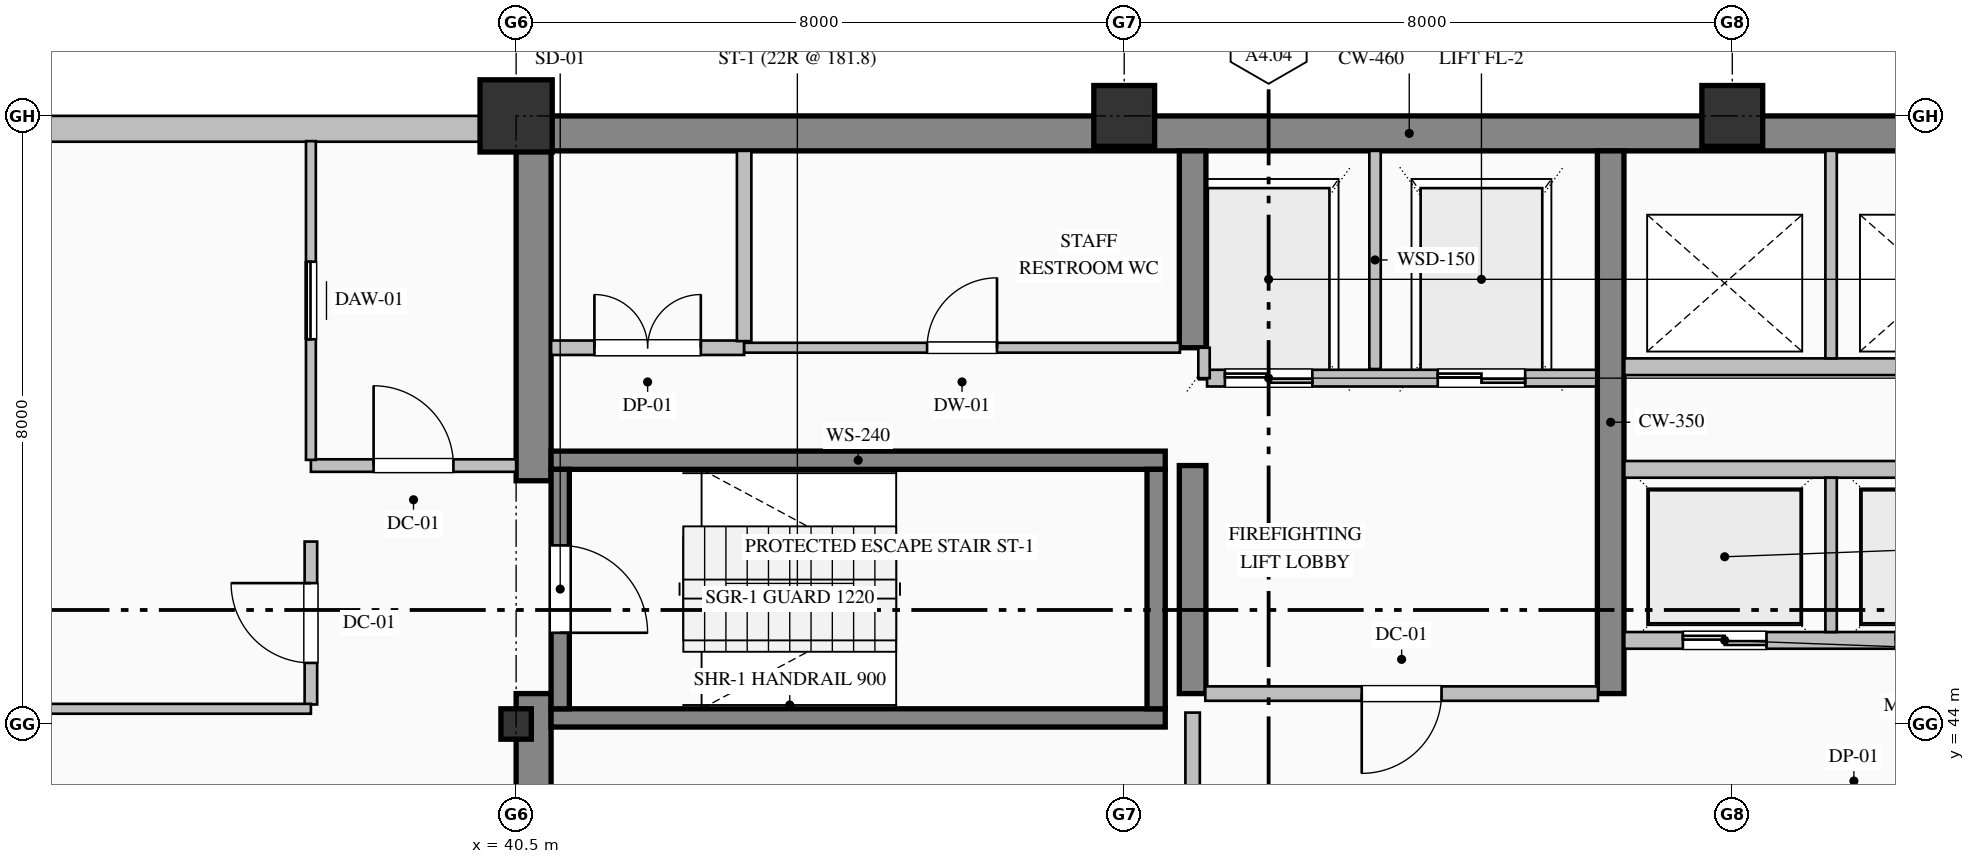
"""IFC4 building model, lengths in metres.
Left out: names, types, materials, properties, quantities, classifications, styles, units other than length and angle.
Written with IfcOpenShell. Run it as: python <this file> out.ifc"""

import sys

from ifc_helpers import new_model, si_unit, direction, frame, frame_2d, origin, origin_2d, place, context, subcontext, project, spatial, rectangle, hollow_rectangle, i_section, extrude, element, fill, save


model = new_model("IFC4")
c1 = context("Model", 3, precision=1e-05, world=origin(), true_north=direction((0.0, 1.0)))
c2 = subcontext(c1, "Body", "Model", "MODEL_VIEW")
j1 = project(units=[si_unit("LENGTHUNIT", "METRE"), si_unit("PLANEANGLEUNIT", "RADIAN")], contexts=[c1])
p1 = place(None, origin())
s1 = spatial("IfcSite", under=j1, at=p1, CompositionType="ELEMENT")
p2 = place(p1, origin())
s2 = spatial("IfcBuilding", under=s1, at=p2, CompositionType="ELEMENT")
p3 = place(p2, frame((0.0, 0.0, 261.8)))
s3 = spatial("IfcBuildingStorey", under=s2, at=p3, CompositionType="ELEMENT", Elevation=261.8)
p4 = place(p3, frame((40.5, 51.77, 0.0), z_axis=(0.0, 0.0, 1.0), x_axis=(1.0, 0.0, 0.0)))
e1 = element("IfcWall", 1, at=p4, inside=s3, PredefinedType="SHEAR", context=c2, shape_type="SweptSolid", body=[
    extrude(rectangle(XDim=23.5, YDim=0.46, at=frame_2d((11.75, 0.0))), origin(), (0.0, 0.0, 1.0), 3.775),
])
p5 = place(p3, frame((40.73, 36.46, 0.0), z_axis=(0.0, 0.0, 1.0), x_axis=(0.0, 1.0, 0.0)))
e2 = element("IfcWall", 2, at=p5, inside=s3, PredefinedType="SHEAR", context=c2, shape_type="SweptSolid", body=[
    extrude(rectangle(XDim=7.94, YDim=0.46, at=frame_2d((3.97, 0.0))), origin(), (0.0, 0.0, 1.0), 3.775),
])
p6 = place(p3, frame((40.73, 47.2, 0.0), z_axis=(0.0, 0.0, 1.0), x_axis=(0.0, 1.0, 0.0)))
e3 = element("IfcWall", 3, at=p6, inside=s3, PredefinedType="SHEAR", context=c2, shape_type="SweptSolid", body=[
    extrude(rectangle(XDim=4.34, YDim=0.46, at=frame_2d((2.17, 0.0))), origin(), (0.0, 0.0, 1.0), 3.775),
])
p7 = place(p3, frame((49.4, 44.4, 0.0), z_axis=(0.0, 0.0, 1.0), x_axis=(0.0, 1.0, 0.0)))
e4 = element("IfcWall", 4, at=p7, inside=s3, PredefinedType="SHEAR", context=c2, shape_type="SweptSolid", body=[
    extrude(rectangle(XDim=3.0, YDim=0.35, at=frame_2d((1.5, 0.0))), origin(), (0.0, 0.0, 1.0), 3.775),
])
p8 = place(p3, frame((49.4, 48.95, 0.0), z_axis=(0.0, 0.0, 1.0), x_axis=(0.0, 1.0, 0.0)))
e5 = element("IfcWall", 5, at=p8, inside=s3, PredefinedType="SHEAR", context=c2, shape_type="SweptSolid", body=[
    extrude(rectangle(XDim=2.59, YDim=0.35, at=frame_2d((1.295, 0.0))), origin(), (0.0, 0.0, 1.0), 3.775),
])
p9 = place(p3, frame((54.9, 44.4, 0.0), z_axis=(0.0, 0.0, 1.0), x_axis=(0.0, 1.0, 0.0)))
e6 = element("IfcWall", 6, at=p9, inside=s3, PredefinedType="SHEAR", context=c2, shape_type="SweptSolid", body=[
    extrude(rectangle(XDim=7.14, YDim=0.35, at=frame_2d((3.57, 0.0))), origin(), (0.0, 0.0, 1.0), 3.775),
])
p10 = place(p3, frame((40.5, 44.0, 0.0), z_axis=(0.0, 0.0, 1.0), x_axis=(1.0, 0.0, 0.0)))
e7 = element("IfcColumn", 7, at=p10, inside=s3, PredefinedType="COLUMN", context=c2, shape_type="SweptSolid", body=[
    extrude(i_section(OverallWidth=0.4, OverallDepth=0.4, WebThickness=0.013, FlangeThickness=0.021, FilletRadius=0.022, at=origin_2d()), origin(), (0.0, 0.0, 1.0), 4.0),
])
p11 = place(p3, frame((40.5, 52.0, 0.0), z_axis=(0.0, 0.0, 1.0), x_axis=(1.0, 0.0, 0.0)))
e8 = element("IfcColumn", 8, at=p11, inside=s3, PredefinedType="COLUMN", context=c2, shape_type="SweptSolid", body=[
    extrude(hollow_rectangle(XDim=0.95, YDim=0.95, WallThickness=0.036, at=origin_2d()), origin(), (0.0, 0.0, 1.0), 4.0),
])
for number, where, z_axis, x_axis in (
    (9, (48.5, 52.0, 0.0), (0.0, 0.0, 1.0), (1.0, 0.0, 0.0)),
    (10, (56.5, 52.0, 0.0), (0.0, 0.0, 1.0), (1.0, 0.0, 0.0)),
):
    element("IfcColumn", number, at=place(p3, frame(where, z_axis=z_axis, x_axis=x_axis)), inside=s3, PredefinedType="COLUMN", context=c2, shape_type="SweptSolid", body=[
        extrude(hollow_rectangle(XDim=0.8, YDim=0.8, WallThickness=0.032, at=origin_2d()), origin(), (0.0, 0.0, 1.0), 4.0),
    ])
p12 = place(p3, frame((13.0, 51.83, 0.0), z_axis=(0.0, 0.0, 1.0), x_axis=(1.0, 0.0, 0.0)))
e11 = element("IfcWall", 11, at=p12, inside=s3, PredefinedType="SOLIDWALL", context=c2, shape_type="SweptSolid", body=[
    extrude(rectangle(XDim=27.52, YDim=0.34, at=frame_2d((13.76, 0.0))), origin(), (0.0, 0.0, 1.0), 3.325),
])
p13 = place(p12, frame((6.6, 0.0, 0.9)))
e12 = element("IfcOpeningElement", 12, at=p13, cuts=e11, PredefinedType="OPENING", context=c2, shape_type="SweptSolid", body=[
    extrude(rectangle(XDim=1.2, YDim=1.85, at=frame_2d((0.6, 0.925))), frame((0.0, 0.18, 0.0), z_axis=(0.0, -1.0, 0.0), x_axis=(1.0, 0.0, 0.0)), (0.0, 0.0, 1.0), 0.36),
])
p14 = place(p12, frame((17.4, 0.0, 0.9)))
e13 = element("IfcOpeningElement", 13, at=p14, cuts=e11, PredefinedType="OPENING", context=c2, shape_type="SweptSolid", body=[
    extrude(rectangle(XDim=1.2, YDim=1.85, at=frame_2d((0.6, 0.925))), frame((0.0, 0.18, 0.0), z_axis=(0.0, -1.0, 0.0), x_axis=(1.0, 0.0, 0.0)), (0.0, 0.0, 1.0), 0.36),
])
for number, where, z_axis, x_axis in (
    (14, (40.96, 47.47, 0.0), (0.0, 0.0, 1.0), (1.0, 0.0, 0.0)),
    (15, (49.04, 44.08, 0.0), (0.0, 0.0, 1.0), (-1.0, 0.0, 0.0)),
):
    element("IfcWall", number, at=place(p3, frame(where, z_axis=z_axis, x_axis=x_axis)), inside=s3, PredefinedType="SOLIDWALL", context=c2, shape_type="SweptSolid", body=[
        extrude(rectangle(XDim=8.08, YDim=0.24, at=frame_2d((4.04, 0.0))), origin(), (0.0, 0.0, 1.0), 4.0),
    ])
p15 = place(p3, frame((41.08, 47.35, 0.0), z_axis=(0.0, 0.0, 1.0), x_axis=(0.0, -1.0, 0.0)))
e16 = element("IfcWall", 16, at=p15, inside=s3, PredefinedType="SOLIDWALL", context=c2, shape_type="SweptSolid", body=[
    extrude(rectangle(XDim=3.15, YDim=0.24, at=frame_2d((1.575, 0.0))), origin(), (0.0, 0.0, 1.0), 4.0),
])
p16 = place(p15, frame((1.0, 0.0, 0.0)))
e17 = element("IfcOpeningElement", 17, at=p16, cuts=e16, PredefinedType="OPENING", context=c2, shape_type="SweptSolid", body=[
    extrude(rectangle(XDim=1.15, YDim=2.2, at=frame_2d((0.575, 1.1))), frame((0.0, 0.13, 0.0), z_axis=(0.0, -1.0, 0.0), x_axis=(1.0, 0.0, 0.0)), (0.0, 0.0, 1.0), 0.26),
])
p17 = place(p3, frame((48.92, 44.2, 0.0), z_axis=(0.0, 0.0, 1.0), x_axis=(0.0, 1.0, 0.0)))
e18 = element("IfcWall", 18, at=p17, inside=s3, PredefinedType="SOLIDWALL", context=c2, shape_type="SweptSolid", body=[
    extrude(rectangle(XDim=3.15, YDim=0.24, at=frame_2d((1.575, 0.0))), origin(), (0.0, 0.0, 1.0), 4.0),
])
p18 = place(p3, frame((54.71, 48.55, 0.0), z_axis=(0.0, 0.0, 1.0), x_axis=(-1.0, 0.0, 0.0)))
e19 = element("IfcWall", 19, at=p18, inside=s3, PredefinedType="PARTITIONING", context=c2, shape_type="SweptSolid", body=[
    extrude(rectangle(XDim=5.12, YDim=0.22, at=frame_2d((2.56, 0.0))), origin(), (0.0, 0.0, 1.0), 3.775),
])
p19 = place(p18, frame((3.735, 0.0, 0.0)))
e20 = element("IfcOpeningElement", 20, at=p19, cuts=e19, PredefinedType="OPENING", context=c2, shape_type="SweptSolid", body=[
    extrude(rectangle(XDim=1.15, YDim=2.2, at=frame_2d((0.575, 1.1))), frame((0.0, 0.12, 0.0), z_axis=(0.0, -1.0, 0.0), x_axis=(1.0, 0.0, 0.0)), (0.0, 0.0, 1.0), 0.24),
])
p20 = place(p18, frame((0.935, 0.0, 0.0)))
e21 = element("IfcOpeningElement", 21, at=p20, cuts=e19, PredefinedType="OPENING", context=c2, shape_type="SweptSolid", body=[
    extrude(rectangle(XDim=1.15, YDim=2.2, at=frame_2d((0.575, 1.1))), frame((0.0, 0.12, 0.0), z_axis=(0.0, -1.0, 0.0), x_axis=(1.0, 0.0, 0.0)), (0.0, 0.0, 1.0), 0.24),
])
p21 = place(p3, frame((51.8, 48.67, 0.0), z_axis=(0.0, 0.0, 1.0), x_axis=(0.0, 1.0, 0.0)))
e22 = element("IfcWall", 22, at=p21, inside=s3, PredefinedType="PARTITIONING", context=c2, shape_type="SweptSolid", body=[
    extrude(rectangle(XDim=2.87, YDim=0.15, at=frame_2d((1.435, 0.0))), origin(), (0.0, 0.0, 1.0), 3.775),
])
p22 = place(p3, frame((49.55, 48.55, 0.0), z_axis=(0.0, 0.0, 1.0), x_axis=(0.0, 1.0, 0.0)))
e23 = element("IfcWall", 23, at=p22, inside=s3, PredefinedType="PARTITIONING", context=c2, shape_type="SweptSolid", body=[
    extrude(rectangle(XDim=0.4, YDim=0.15, at=frame_2d((0.2, 0.0))), origin(), (0.0, 0.0, 1.0), 3.775),
])
p23 = place(p3, frame((63.32, 45.1, 0.0), z_axis=(0.0, 0.0, 1.0), x_axis=(-1.0, 0.0, 0.0)))
e24 = element("IfcWall", 24, at=p23, inside=s3, PredefinedType="PARTITIONING", context=c2, shape_type="SweptSolid", body=[
    extrude(rectangle(XDim=8.24, YDim=0.22, at=frame_2d((4.12, 0.0))), origin(), (0.0, 0.0, 1.0), 3.775),
])
p24 = place(p23, frame((6.37, 0.0, 0.0)))
e25 = element("IfcOpeningElement", 25, at=p24, cuts=e24, PredefinedType="OPENING", context=c2, shape_type="SweptSolid", body=[
    extrude(rectangle(XDim=1.1, YDim=2.2, at=frame_2d((0.55, 1.1))), frame((0.0, 0.12, 0.0), z_axis=(0.0, -1.0, 0.0), x_axis=(1.0, 0.0, 0.0)), (0.0, 0.0, 1.0), 0.24),
])
p25 = place(p23, frame((3.57, 0.0, 0.0)))
e26 = element("IfcOpeningElement", 26, at=p25, cuts=e24, PredefinedType="OPENING", context=c2, shape_type="SweptSolid", body=[
    extrude(rectangle(XDim=1.1, YDim=2.2, at=frame_2d((0.55, 1.1))), frame((0.0, 0.12, 0.0), z_axis=(0.0, -1.0, 0.0), x_axis=(1.0, 0.0, 0.0)), (0.0, 0.0, 1.0), 0.24),
])
p26 = place(p23, frame((0.77, 0.0, 0.0)))
e27 = element("IfcOpeningElement", 27, at=p26, cuts=e24, PredefinedType="OPENING", context=c2, shape_type="SweptSolid", body=[
    extrude(rectangle(XDim=1.1, YDim=2.2, at=frame_2d((0.55, 1.1))), frame((0.0, 0.12, 0.0), z_axis=(0.0, -1.0, 0.0), x_axis=(1.0, 0.0, 0.0)), (0.0, 0.0, 1.0), 0.24),
])
p27 = place(p3, frame((55.08, 47.35, 0.0), z_axis=(0.0, 0.0, 1.0), x_axis=(1.0, 0.0, 0.0)))
e28 = element("IfcWall", 28, at=p27, inside=s3, PredefinedType="PARTITIONING", context=c2, shape_type="SweptSolid", body=[
    extrude(rectangle(XDim=8.24, YDim=0.22, at=frame_2d((4.12, 0.0))), origin(), (0.0, 0.0, 1.0), 3.775),
])
p28 = place(p3, frame((57.8, 45.21, 0.0), z_axis=(0.0, 0.0, 1.0), x_axis=(0.0, 1.0, 0.0)))
e29 = element("IfcWall", 29, at=p28, inside=s3, PredefinedType="PARTITIONING", context=c2, shape_type="SweptSolid", body=[
    extrude(rectangle(XDim=2.03, YDim=0.15, at=frame_2d((1.015, 0.0))), origin(), (0.0, 0.0, 1.0), 3.775),
])
p29 = place(p3, frame((63.32, 48.7, 0.0), z_axis=(0.0, 0.0, 1.0), x_axis=(-1.0, 0.0, 0.0)))
e30 = element("IfcWall", 30, at=p29, inside=s3, PredefinedType="PARTITIONING", context=c2, shape_type="SweptSolid", body=[
    extrude(rectangle(XDim=8.24, YDim=0.22, at=frame_2d((4.12, 0.0))), origin(), (0.0, 0.0, 1.0), 3.775),
])
p30 = place(p3, frame((57.8, 48.81, 0.0), z_axis=(0.0, 0.0, 1.0), x_axis=(0.0, 1.0, 0.0)))
e31 = element("IfcWall", 31, at=p30, inside=s3, PredefinedType="PARTITIONING", context=c2, shape_type="SweptSolid", body=[
    extrude(rectangle(XDim=2.73, YDim=0.15, at=frame_2d((1.365, 0.0))), origin(), (0.0, 0.0, 1.0), 3.775),
])
p31 = place(p3, frame((37.8, 47.4, 0.0), z_axis=(0.0, 0.0, 1.0), x_axis=(1.0, 0.0, 0.0)))
e32 = element("IfcWall", 32, at=p31, inside=s3, PredefinedType="PARTITIONING", context=c2, shape_type="SweptSolid", body=[
    extrude(rectangle(XDim=2.7, YDim=0.165, at=frame_2d((1.35, 0.0))), origin(), (0.0, 0.0, 1.0), 3.775),
])
p32 = place(p31, frame((0.825, 0.0, 0.0)))
e33 = element("IfcOpeningElement", 33, at=p32, cuts=e32, PredefinedType="OPENING", context=c2, shape_type="SweptSolid", body=[
    extrude(rectangle(XDim=1.05, YDim=2.15, at=frame_2d((0.525, 1.075))), frame((0.0, 0.093, 0.0), z_axis=(0.0, -1.0, 0.0), x_axis=(1.0, 0.0, 0.0)), (0.0, 0.0, 1.0), 0.185),
])
p33 = place(p3, frame((37.8, 44.257, 0.0), z_axis=(0.0, 0.0, 1.0), x_axis=(0.0, 1.0, 0.0)))
e34 = element("IfcWall", 34, at=p33, inside=s3, PredefinedType="PARTITIONING", context=c2, shape_type="SweptSolid", body=[
    extrude(rectangle(XDim=2.143, YDim=0.165, at=frame_2d((1.071, 0.0))), origin(), (0.0, 0.0, 1.0), 3.775),
])
p34 = place(p33, frame((0.546, 0.0, 0.0)))
e35 = element("IfcOpeningElement", 35, at=p34, cuts=e34, PredefinedType="OPENING", context=c2, shape_type="SweptSolid", body=[
    extrude(rectangle(XDim=1.05, YDim=2.15, at=frame_2d((0.525, 1.075))), frame((0.0, 0.093, 0.0), z_axis=(0.0, -1.0, 0.0), x_axis=(1.0, 0.0, 0.0)), (0.0, 0.0, 1.0), 0.185),
])
p35 = place(p3, frame((37.8, 47.475, 0.0), z_axis=(0.0, 0.0, 1.0), x_axis=(0.0, 1.0, 0.0)))
e36 = element("IfcWall", 36, at=p35, inside=s3, PredefinedType="PARTITIONING", context=c2, shape_type="SweptSolid", body=[
    extrude(rectangle(XDim=4.193, YDim=0.13, at=frame_2d((2.097, 0.0))), origin(), (0.0, 0.0, 1.0), 3.775),
])
p36 = place(p35, frame((1.587, 0.0, 0.0)))
e37 = element("IfcOpeningElement", 37, at=p36, cuts=e36, PredefinedType="OPENING", context=c2, shape_type="SweptSolid", body=[
    extrude(rectangle(XDim=1.02, YDim=2.15, at=frame_2d((0.51, 1.075))), frame((0.0, 0.075, 0.0), z_axis=(0.0, -1.0, 0.0), x_axis=(1.0, 0.0, 0.0)), (0.0, 0.0, 1.0), 0.15),
])
p37 = place(p3, frame((40.96, 48.95, 0.0), z_axis=(0.0, 0.0, 1.0), x_axis=(1.0, 0.0, 0.0)))
e38 = element("IfcWall", 38, at=p37, inside=s3, PredefinedType="PARTITIONING", context=c2, shape_type="SweptSolid", body=[
    extrude(rectangle(XDim=2.54, YDim=0.19, at=frame_2d((1.27, 0.0))), origin(), (0.0, 0.0, 1.0), 3.775),
])
p38 = place(p37, frame((0.57, 0.0, 0.0)))
e39 = element("IfcOpeningElement", 39, at=p38, cuts=e38, PredefinedType="OPENING", context=c2, shape_type="SweptSolid", body=[
    extrude(rectangle(XDim=1.4, YDim=2.25, at=frame_2d((0.7, 1.125))), frame((0.0, 0.105, 0.0), z_axis=(0.0, -1.0, 0.0), x_axis=(1.0, 0.0, 0.0)), (0.0, 0.0, 1.0), 0.21),
])
p39 = place(p3, frame((43.5, 48.95, 0.0), z_axis=(0.0, 0.0, 1.0), x_axis=(1.0, 0.0, 0.0)))
e40 = element("IfcWall", 40, at=p39, inside=s3, PredefinedType="PARTITIONING", context=c2, shape_type="SweptSolid", body=[
    extrude(rectangle(XDim=5.733, YDim=0.13, at=frame_2d((2.866, 0.0))), origin(), (0.0, 0.0, 1.0), 3.775),
])
p40 = place(p39, frame((2.406, 0.0, 0.0)))
e41 = element("IfcOpeningElement", 41, at=p40, cuts=e40, PredefinedType="OPENING", context=c2, shape_type="SweptSolid", body=[
    extrude(rectangle(XDim=0.92, YDim=2.15, at=frame_2d((0.46, 1.075))), frame((0.0, 0.075, 0.0), z_axis=(0.0, -1.0, 0.0), x_axis=(1.0, 0.0, 0.0)), (0.0, 0.0, 1.0), 0.15),
])
p41 = place(p3, frame((54.733, 44.4, 0.0), z_axis=(0.0, 0.0, 1.0), x_axis=(-1.0, 0.0, 0.0)))
e42 = element("IfcWall", 42, at=p41, inside=s3, PredefinedType="PARTITIONING", context=c2, shape_type="SweptSolid", body=[
    extrude(rectangle(XDim=5.166, YDim=0.19, at=frame_2d((2.583, 0.0))), origin(), (0.0, 0.0, 1.0), 3.775),
])
p42 = place(p41, frame((2.058, 0.0, 0.0)))
e43 = element("IfcOpeningElement", 43, at=p42, cuts=e42, PredefinedType="OPENING", context=c2, shape_type="SweptSolid", body=[
    extrude(rectangle(XDim=1.05, YDim=2.15, at=frame_2d((0.525, 1.075))), frame((0.0, 0.105, 0.0), z_axis=(0.0, -1.0, 0.0), x_axis=(1.0, 0.0, 0.0)), (0.0, 0.0, 1.0), 0.21),
])
p43 = place(p3, frame((49.4, 40.487, 0.0), z_axis=(0.0, 0.0, 1.0), x_axis=(0.0, 1.0, 0.0)))
e44 = element("IfcWall", 44, at=p43, inside=s3, PredefinedType="PARTITIONING", context=c2, shape_type="SweptSolid", body=[
    extrude(rectangle(XDim=3.663, YDim=0.19, at=frame_2d((1.832, 0.0))), origin(), (0.0, 0.0, 1.0), 3.017),
])
p44 = place(p43, frame((1.132, 0.0, 0.0)))
e45 = element("IfcOpeningElement", 45, at=p44, cuts=e44, PredefinedType="OPENING", context=c2, shape_type="SweptSolid", body=[
    extrude(rectangle(XDim=1.4, YDim=2.25, at=frame_2d((0.7, 1.125))), frame((0.0, 0.105, 0.0), z_axis=(0.0, -1.0, 0.0), x_axis=(1.0, 0.0, 0.0)), (0.0, 0.0, 1.0), 0.21),
])
p45 = place(p3, frame((43.5, 51.54, 0.0), z_axis=(0.0, 0.0, 1.0), x_axis=(0.0, -1.0, 0.0)))
e46 = element("IfcWall", 46, at=p45, inside=s3, PredefinedType="PARTITIONING", context=c2, shape_type="SweptSolid", body=[
    extrude(rectangle(XDim=2.503, YDim=0.19, at=frame_2d((1.251, 0.0))), origin(), (0.0, 0.0, 1.0), 3.775),
])
p46 = place(p3, frame((37.8, 44.2, 0.0), z_axis=(0.0, 0.0, 1.0), x_axis=(-1.0, 0.0, 0.0)))
e47 = element("IfcWall", 47, at=p46, inside=s3, PredefinedType="PARTITIONING", context=c2, shape_type="SweptSolid", body=[
    extrude(rectangle(XDim=8.2, YDim=0.13, at=frame_2d((4.1, 0.0))), origin(), (0.0, 0.0, 1.0), 3.775),
])
p47 = place(p46, frame((3.6, 0.0, 0.0)))
e48 = element("IfcOpeningElement", 48, at=p47, cuts=e47, PredefinedType="OPENING", context=c2, shape_type="SweptSolid", body=[
    extrude(rectangle(XDim=1.0, YDim=2.15, at=frame_2d((0.5, 1.075))), frame((0.0, 0.075, 0.0), z_axis=(0.0, -1.0, 0.0), x_axis=(1.0, 0.0, 0.0)), (0.0, 0.0, 1.0), 0.15),
])
p48 = place(p16, origin())
e49 = element("IfcDoor", 49, at=p48, inside=s3, OperationType="SINGLE_SWING_RIGHT", PredefinedType="DOOR", context=c2, shape_type="SweptSolid", body=[
    extrude(rectangle(XDim=1.15, YDim=2.2, at=frame_2d((0.575, 1.1))), frame((0.0, 0.025, 0.0), z_axis=(0.0, -1.0, 0.0), x_axis=(1.0, 0.0, 0.0)), (0.0, 0.0, 1.0), 0.05),
])
fill(e17, e49)
p49 = place(p19, origin())
e50 = element("IfcDoor", 50, at=p49, inside=s3, OperationType="DOUBLE_DOOR_SLIDING", PredefinedType="DOOR", context=c2, shape_type="SweptSolid", body=[
    extrude(rectangle(XDim=1.15, YDim=2.2, at=frame_2d((0.575, 1.1))), frame((0.0, 0.025, 0.0), z_axis=(0.0, -1.0, 0.0), x_axis=(1.0, 0.0, 0.0)), (0.0, 0.0, 1.0), 0.05),
])
fill(e20, e50)
p50 = place(p20, origin())
e51 = element("IfcDoor", 51, at=p50, inside=s3, OperationType="DOUBLE_DOOR_SLIDING", PredefinedType="DOOR", context=c2, shape_type="SweptSolid", body=[
    extrude(rectangle(XDim=1.15, YDim=2.2, at=frame_2d((0.575, 1.1))), frame((0.0, 0.025, 0.0), z_axis=(0.0, -1.0, 0.0), x_axis=(1.0, 0.0, 0.0)), (0.0, 0.0, 1.0), 0.05),
])
fill(e21, e51)
p51 = place(p24, origin())
e52 = element("IfcDoor", 52, at=p51, inside=s3, OperationType="DOUBLE_DOOR_SLIDING", PredefinedType="DOOR", context=c2, shape_type="SweptSolid", body=[
    extrude(rectangle(XDim=1.1, YDim=2.2, at=frame_2d((0.55, 1.1))), frame((0.0, 0.025, 0.0), z_axis=(0.0, -1.0, 0.0), x_axis=(1.0, 0.0, 0.0)), (0.0, 0.0, 1.0), 0.05),
])
fill(e25, e52)
p52 = place(p42, origin())
e53 = element("IfcDoor", 53, at=p52, inside=s3, OperationType="SINGLE_SWING_RIGHT", PredefinedType="DOOR", context=c2, shape_type="SweptSolid", body=[
    extrude(rectangle(XDim=1.05, YDim=2.15, at=frame_2d((0.525, 1.075))), frame((0.0, 0.025, 0.0), z_axis=(0.0, -1.0, 0.0), x_axis=(1.0, 0.0, 0.0)), (0.0, 0.0, 1.0), 0.05),
])
fill(e43, e53)
p53 = place(p32, origin())
e54 = element("IfcDoor", 54, at=p53, inside=s3, OperationType="SINGLE_SWING_LEFT", PredefinedType="DOOR", context=c2, shape_type="SweptSolid", body=[
    extrude(rectangle(XDim=1.05, YDim=2.15, at=frame_2d((0.525, 1.075))), frame((0.0, 0.025, 0.0), z_axis=(0.0, -1.0, 0.0), x_axis=(1.0, 0.0, 0.0)), (0.0, 0.0, 1.0), 0.05),
])
fill(e33, e54)
p54 = place(p34, origin())
e55 = element("IfcDoor", 55, at=p54, inside=s3, OperationType="SINGLE_SWING_RIGHT", PredefinedType="DOOR", context=c2, shape_type="SweptSolid", body=[
    extrude(rectangle(XDim=1.05, YDim=2.15, at=frame_2d((0.525, 1.075))), frame((0.0, 0.025, 0.0), z_axis=(0.0, -1.0, 0.0), x_axis=(1.0, 0.0, 0.0)), (0.0, 0.0, 1.0), 0.05),
])
fill(e35, e55)
p55 = place(p36, origin())
e56 = element("IfcDoor", 56, at=p55, inside=s3, OperationType="SLIDING_TO_LEFT", PredefinedType="DOOR", context=c2, shape_type="SweptSolid", body=[
    extrude(rectangle(XDim=1.02, YDim=2.15, at=frame_2d((0.51, 1.075))), frame((0.0, 0.025, 0.0), z_axis=(0.0, -1.0, 0.0), x_axis=(1.0, 0.0, 0.0)), (0.0, 0.0, 1.0), 0.05),
])
fill(e37, e56)
p56 = place(p38, origin())
e57 = element("IfcDoor", 57, at=p56, inside=s3, OperationType="DOUBLE_DOOR_SINGLE_SWING", PredefinedType="DOOR", context=c2, shape_type="SweptSolid", body=[
    extrude(rectangle(XDim=1.4, YDim=2.25, at=frame_2d((0.7, 1.125))), frame((0.0, 0.025, 0.0), z_axis=(0.0, -1.0, 0.0), x_axis=(1.0, 0.0, 0.0)), (0.0, 0.0, 1.0), 0.05),
])
fill(e39, e57)
p57 = place(p40, origin())
e58 = element("IfcDoor", 58, at=p57, inside=s3, OperationType="SINGLE_SWING_RIGHT", PredefinedType="DOOR", context=c2, shape_type="SweptSolid", body=[
    extrude(rectangle(XDim=0.92, YDim=2.15, at=frame_2d((0.46, 1.075))), frame((0.0, 0.025, 0.0), z_axis=(0.0, -1.0, 0.0), x_axis=(1.0, 0.0, 0.0)), (0.0, 0.0, 1.0), 0.05),
])
fill(e41, e58)
save(model, sys.argv[1])
